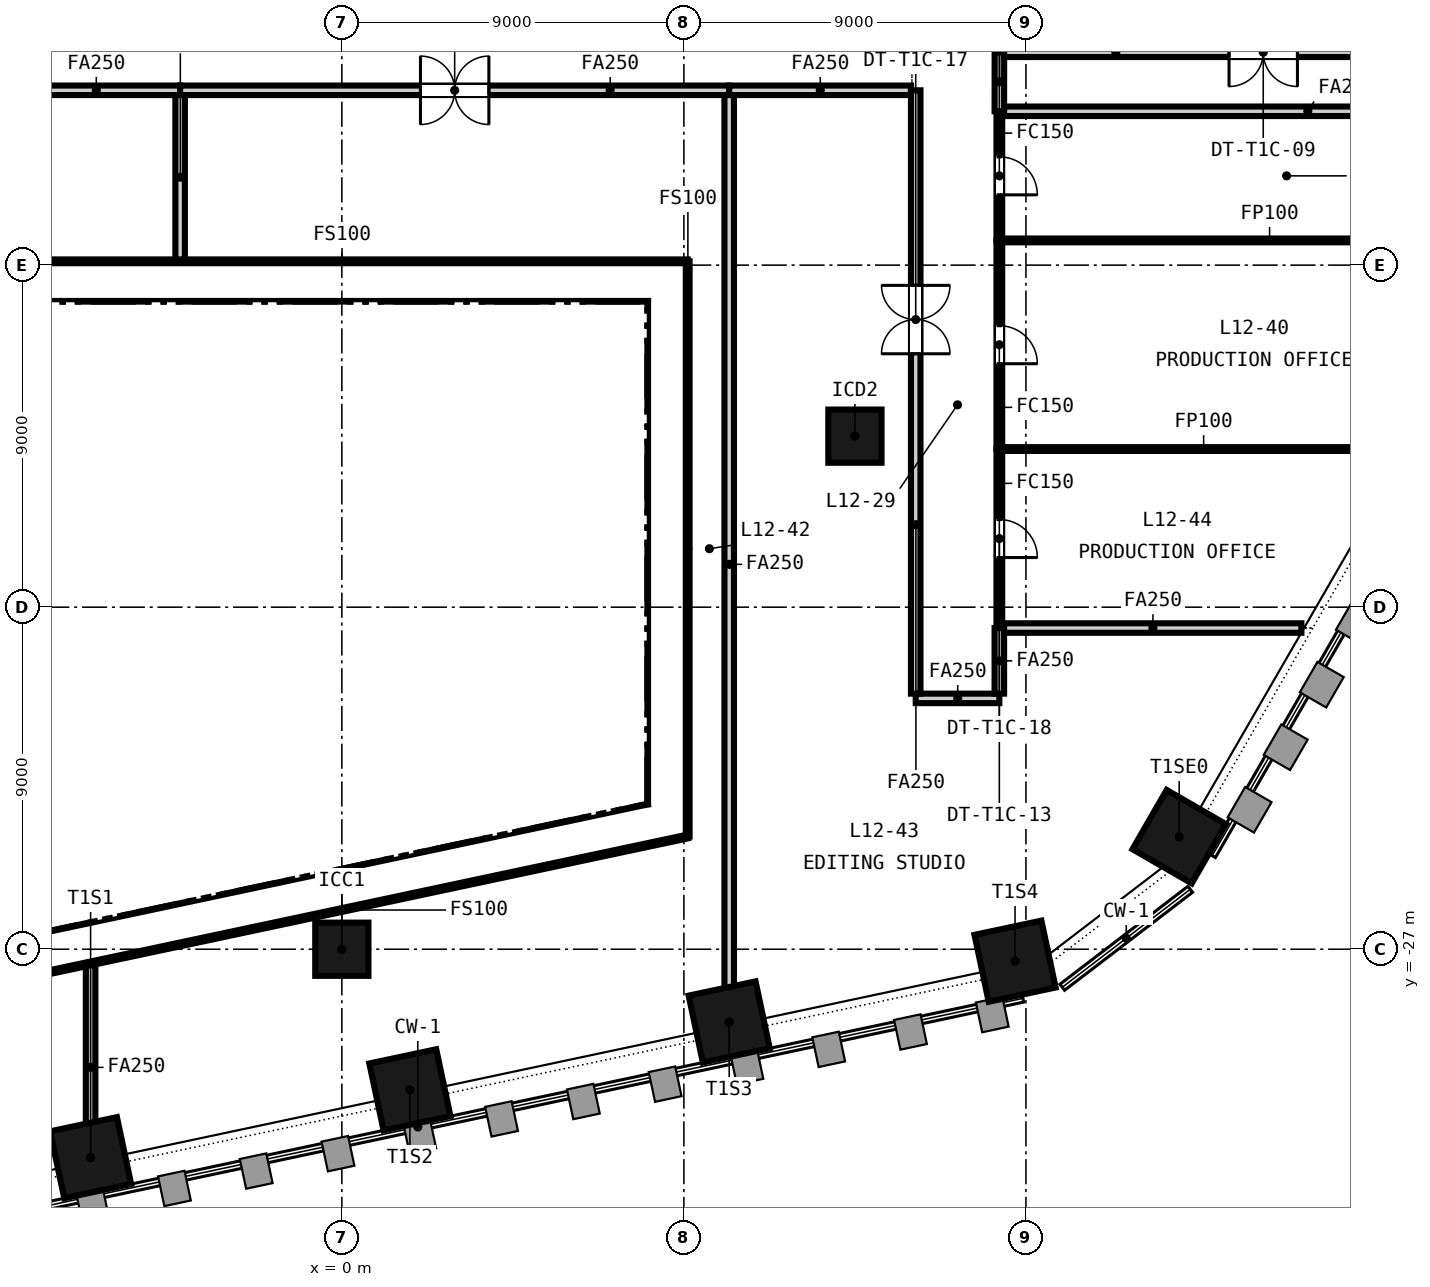
"""IFC4 building model, lengths in metres.
Left out: names, types, materials, properties, quantities, classifications, styles, units other than length and angle.
Written with IfcOpenShell. Run it as: python <this file> out.ifc"""

import sys

from ifc_helpers import new_model, si_unit, direction, frame, frame_2d, origin, origin_2d, place, context, subcontext, project, spatial, rectangle, extrude, element, fill, save


model = new_model("IFC4")
c1 = context("Model", 3, precision=1e-05, world=origin(), true_north=direction((0.0, 1.0)))
c2 = subcontext(c1, "Body", "Model", "MODEL_VIEW")
j1 = project(units=[si_unit("LENGTHUNIT", "METRE"), si_unit("PLANEANGLEUNIT", "RADIAN")], contexts=[c1])
p1 = place(None, origin())
s1 = spatial("IfcSite", under=j1, at=p1, CompositionType="ELEMENT")
p2 = place(p1, origin())
s2 = spatial("IfcBuilding", under=s1, at=p2, CompositionType="ELEMENT")
p3 = place(p2, frame((0.0, 0.0, 57.9)))
s3 = spatial("IfcBuildingStorey", under=s2, at=p3, CompositionType="ELEMENT", Elevation=57.9)
for number, where, z_axis, x_axis in (
    (1, (-6.611, -32.485, -0.15), (0.0, 0.0, 1.0), (0.978, 0.208, 0.0)),
    (2, (1.791, -30.699, -0.15), (0.0, 0.0, 1.0), (0.978, 0.208, 0.0)),
    (3, (10.192, -28.914, -0.15), (0.0, 0.0, 1.0), (0.978, 0.208, 0.0)),
    (4, (17.714, -27.315, -0.15), (0.0, 0.0, 1.0), (0.978, 0.208, 0.0)),
    (5, (22.032, -24.039, -0.15), (0.0, 0.0, 1.0), (0.5, 0.866, 0.0)),
):
    element("IfcColumn", number, at=place(p3, frame(where, z_axis=z_axis, x_axis=x_axis)), inside=s3, PredefinedType="COLUMN", context=c2, shape_type="SweptSolid", body=[
        extrude(rectangle(XDim=1.8, YDim=1.8, at=origin_2d()), origin(), (0.0, 0.0, 1.0), 3.65),
    ])
for number, where, z_axis, x_axis in (
    (6, (0.0, -27.0, -0.15), (0.0, 0.0, 1.0), (1.0, 0.0, 0.0)),
    (7, (13.5, -13.5, -0.15), (0.0, 0.0, 1.0), (1.0, 0.0, 0.0)),
):
    element("IfcColumn", number, at=place(p3, frame(where, z_axis=z_axis, x_axis=x_axis)), inside=s3, PredefinedType="COLUMN", context=c2, shape_type="SweptSolid", body=[
        extrude(rectangle(XDim=1.4, YDim=1.4, at=origin_2d()), origin(), (0.0, 0.0, 1.0), 3.65),
    ])
p4 = place(p3, frame((-4.255, -4.4, 0.0), z_axis=(0.0, 0.0, 1.0), x_axis=(-1.0, 0.0, 0.0)))
e8 = element("IfcWall", 8, at=p4, inside=s3, PredefinedType="PARTITIONING", context=c2, shape_type="SweptSolid", body=[
    extrude(rectangle(XDim=10.72, YDim=0.25, at=frame_2d((5.36, 0.0))), origin(), (0.0, 0.0, 1.0), 2.741),
])
p5 = place(p4, frame((4.472, 0.0, 0.0)))
e9 = element("IfcOpeningElement", 9, at=p5, cuts=e8, PredefinedType="OPENING", context=c2, shape_type="SweptSolid", body=[
    extrude(rectangle(XDim=1.8, YDim=2.1, at=frame_2d((0.9, 1.05))), frame((0.0, 0.135, 0.0), z_axis=(0.0, -1.0, 0.0), x_axis=(1.0, 0.0, 0.0)), (0.0, 0.0, 1.0), 0.27),
])
p6 = place(p3, frame((10.192, -4.4, 0.0), z_axis=(0.0, 0.0, 1.0), x_axis=(-1.0, 0.0, 0.0)))
e10 = element("IfcWall", 10, at=p6, inside=s3, PredefinedType="PARTITIONING", context=c2, shape_type="SweptSolid", body=[
    extrude(rectangle(XDim=14.447, YDim=0.25, at=frame_2d((7.223, 0.0))), origin(), (0.0, 0.0, 1.0), 2.741),
])
p7 = place(p6, frame((6.323, 0.0, 0.0)))
e11 = element("IfcOpeningElement", 11, at=p7, cuts=e10, PredefinedType="OPENING", context=c2, shape_type="SweptSolid", body=[
    extrude(rectangle(XDim=1.8, YDim=2.1, at=frame_2d((0.9, 1.05))), frame((0.0, 0.135, 0.0), z_axis=(0.0, -1.0, 0.0), x_axis=(1.0, 0.0, 0.0)), (0.0, 0.0, 1.0), 0.27),
])
p8 = place(p3, frame((14.975, -4.4, 0.0), z_axis=(0.0, 0.0, 1.0), x_axis=(-1.0, 0.0, 0.0)))
e12 = element("IfcWall", 12, at=p8, inside=s3, PredefinedType="PARTITIONING", context=c2, shape_type="SweptSolid", body=[
    extrude(rectangle(XDim=4.783, YDim=0.25, at=frame_2d((2.392, 0.0))), origin(), (0.0, 0.0, 1.0), 2.741),
])
p9 = place(p3, frame((17.302, -3.4, 0.0), z_axis=(0.0, 0.0, 1.0), x_axis=(-0.00125845425, -0.999999208146, 0.0)))
e13 = element("IfcWall", 13, at=p9, inside=s3, PredefinedType="PARTITIONING", context=c2, shape_type="SweptSolid", body=[
    extrude(rectangle(XDim=1.552, YDim=0.25, at=frame_2d((0.776, 0.0))), origin(), (0.0, 0.0, 1.0), 2.741),
])
p10 = place(p3, frame((31.061, -3.4, 0.0), z_axis=(0.0, 0.0, 1.0), x_axis=(-1.0, 0.0, 0.0)))
e14 = element("IfcWall", 14, at=p10, inside=s3, PredefinedType="PARTITIONING", context=c2, shape_type="SweptSolid", body=[
    extrude(rectangle(XDim=13.634, YDim=0.25, at=frame_2d((6.817, 0.0))), origin(), (0.0, 0.0, 1.0), 2.741),
])
p11 = place(p10, frame((5.917, 0.0, 0.0)))
e15 = element("IfcOpeningElement", 15, at=p11, cuts=e14, PredefinedType="OPENING", context=c2, shape_type="SweptSolid", body=[
    extrude(rectangle(XDim=1.8, YDim=2.1, at=frame_2d((0.9, 1.05))), frame((0.0, 0.135, 0.0), z_axis=(0.0, -1.0, 0.0), x_axis=(1.0, 0.0, 0.0)), (0.0, 0.0, 1.0), 0.27),
])
p12 = place(p3, frame((17.3, -4.952, 0.0), z_axis=(0.0, 0.0, 1.0), x_axis=(0.0, -1.0, 0.0)))
e16 = element("IfcWall", 16, at=p12, inside=s3, PredefinedType="PARTITIONING", context=c2, shape_type="SweptSolid", body=[
    extrude(rectangle(XDim=3.398, YDim=0.15, at=frame_2d((1.699, 0.0))), origin(), (0.0, 0.0, 1.0), 2.741),
])
p13 = place(p12, frame((1.199, 0.0, 0.0)))
e17 = element("IfcOpeningElement", 17, at=p13, cuts=e16, PredefinedType="OPENING", context=c2, shape_type="SweptSolid", body=[
    extrude(rectangle(XDim=1.0, YDim=2.1, at=frame_2d((0.5, 1.05))), frame((0.0, 0.085, 0.0), z_axis=(0.0, -1.0, 0.0), x_axis=(1.0, 0.0, 0.0)), (0.0, 0.0, 1.0), 0.17),
])
p14 = place(p3, frame((17.3, -8.35, 0.0), z_axis=(0.0, 0.0, 1.0), x_axis=(0.0, -1.0, 0.0)))
e18 = element("IfcWall", 18, at=p14, inside=s3, PredefinedType="PARTITIONING", context=c2, shape_type="SweptSolid", body=[
    extrude(rectangle(XDim=5.489, YDim=0.15, at=frame_2d((2.745, 0.0))), origin(), (0.0, 0.0, 1.0), 2.741),
])
p15 = place(p14, frame((2.244, 0.0, 0.0)))
e19 = element("IfcOpeningElement", 19, at=p15, cuts=e18, PredefinedType="OPENING", context=c2, shape_type="SweptSolid", body=[
    extrude(rectangle(XDim=1.0, YDim=2.1, at=frame_2d((0.5, 1.05))), frame((0.0, 0.085, 0.0), z_axis=(0.0, -1.0, 0.0), x_axis=(1.0, 0.0, 0.0)), (0.0, 0.0, 1.0), 0.17),
])
p16 = place(p3, frame((17.3, -20.4, 0.0), z_axis=(0.0, 0.0, 1.0), x_axis=(-1.0, 0.0, 0.0)))
e20 = element("IfcWall", 20, at=p16, inside=s3, PredefinedType="PARTITIONING", context=c2, shape_type="SweptSolid", body=[
    extrude(rectangle(XDim=2.2, YDim=0.25, at=frame_2d((1.1, 0.0))), origin(), (0.0, 0.0, 1.0), 2.741),
])
p17 = place(p3, frame((17.3, -18.549, 0.0), z_axis=(0.0, 0.0, 1.0), x_axis=(0.0, -1.0, 0.0)))
e21 = element("IfcWall", 21, at=p17, inside=s3, PredefinedType="PARTITIONING", context=c2, shape_type="SweptSolid", body=[
    extrude(rectangle(XDim=1.726, YDim=0.25, at=frame_2d((0.863, 0.0))), origin(), (0.0, 0.0, 1.0), 2.741),
])
p18 = place(p3, frame((17.3, -13.839, 0.0), z_axis=(0.0, 0.0, 1.0), x_axis=(0.0, -1.0, 0.0)))
e22 = element("IfcWall", 22, at=p18, inside=s3, PredefinedType="PARTITIONING", context=c2, shape_type="SweptSolid", body=[
    extrude(rectangle(XDim=4.71, YDim=0.15, at=frame_2d((2.355, 0.0))), origin(), (0.0, 0.0, 1.0), 2.741),
])
p19 = place(p18, frame((1.855, 0.0, 0.0)))
e23 = element("IfcOpeningElement", 23, at=p19, cuts=e22, PredefinedType="OPENING", context=c2, shape_type="SweptSolid", body=[
    extrude(rectangle(XDim=1.0, YDim=2.1, at=frame_2d((0.5, 1.05))), frame((0.0, 0.085, 0.0), z_axis=(0.0, -1.0, 0.0), x_axis=(1.0, 0.0, 0.0)), (0.0, 0.0, 1.0), 0.17),
])
p20 = place(p3, frame((33.398, -4.952, 0.0), z_axis=(0.0, 0.0, 1.0), x_axis=(-1.0, 0.0, 0.0)))
e24 = element("IfcWall", 24, at=p20, inside=s3, PredefinedType="PARTITIONING", context=c2, shape_type="SweptSolid", body=[
    extrude(rectangle(XDim=15.973, YDim=0.25, at=frame_2d((7.986, 0.0))), origin(), (0.0, 0.0, 1.0), 2.741),
])
p21 = place(p3, frame((17.375, -8.35, 0.0), z_axis=(0.0, 0.0, 1.0), x_axis=(1.0, 0.0, 0.0)))
e25 = element("IfcWall", 25, at=p21, inside=s3, PredefinedType="PARTITIONING", context=c2, shape_type="SweptSolid", body=[
    extrude(rectangle(XDim=14.062, YDim=0.1, at=frame_2d((7.031, 0.0))), origin(), (0.0, 0.0, 1.0), 2.741),
])
p22 = place(p3, frame((17.375, -13.839, 0.0), z_axis=(0.0, 0.0, 1.0), x_axis=(1.0, 0.0, 0.0)))
e26 = element("IfcWall", 26, at=p22, inside=s3, PredefinedType="PARTITIONING", context=c2, shape_type="SweptSolid", body=[
    extrude(rectangle(XDim=10.592, YDim=0.1, at=frame_2d((5.296, 0.0))), origin(), (0.0, 0.0, 1.0), 2.741),
])
p23 = place(p3, frame((-6.611, -32.792, 0.0), z_axis=(0.0, 0.0, 1.0), x_axis=(0.0, 1.0, 0.0)))
e27 = element("IfcWall", 27, at=p23, inside=s3, PredefinedType="PARTITIONING", context=c2, shape_type="SweptSolid", body=[
    extrude(rectangle(XDim=5.367, YDim=0.25, at=frame_2d((2.684, 0.0))), origin(), (0.0, 0.0, 1.0), 2.741),
])
p24 = place(p3, frame((-4.255, -8.85, 0.0), z_axis=(0.0, 0.0, 1.0), x_axis=(0.0, 1.0, 0.0)))
e28 = element("IfcWall", 28, at=p24, inside=s3, PredefinedType="PARTITIONING", context=c2, shape_type="SweptSolid", body=[
    extrude(rectangle(XDim=4.325, YDim=0.25, at=frame_2d((2.163, 0.0))), origin(), (0.0, 0.0, 1.0), 2.741),
])
p25 = place(p3, frame((10.192, -29.22, 0.0), z_axis=(0.0, 0.0, 1.0), x_axis=(0.0, 1.0, 0.0)))
e29 = element("IfcWall", 29, at=p25, inside=s3, PredefinedType="PARTITIONING", context=c2, shape_type="SweptSolid", body=[
    extrude(rectangle(XDim=24.695, YDim=0.25, at=frame_2d((12.348, 0.0))), origin(), (0.0, 0.0, 1.0), 2.741),
])
p26 = place(p3, frame((15.1, -20.275, 0.0), z_axis=(0.0, 0.0, 1.0), x_axis=(0.0, 1.0, 0.0)))
e30 = element("IfcWall", 30, at=p26, inside=s3, PredefinedType="PARTITIONING", context=c2, shape_type="SweptSolid", body=[
    extrude(rectangle(XDim=15.875, YDim=0.25, at=frame_2d((7.938, 0.0))), origin(), (0.0, 0.0, 1.0), 2.741),
])
p27 = place(p26, frame((8.942, 0.0, 0.0)))
e31 = element("IfcOpeningElement", 31, at=p27, cuts=e30, PredefinedType="OPENING", context=c2, shape_type="SweptSolid", body=[
    extrude(rectangle(XDim=1.8, YDim=2.1, at=frame_2d((0.9, 1.05))), frame((0.0, 0.135, 0.0), z_axis=(0.0, -1.0, 0.0), x_axis=(1.0, 0.0, 0.0)), (0.0, 0.0, 1.0), 0.27),
])
p28 = place(p3, frame((17.425, -18.549, 0.0), z_axis=(0.0, 0.0, 1.0), x_axis=(1.0, 0.0, 0.0)))
e32 = element("IfcWall", 32, at=p28, inside=s3, PredefinedType="PARTITIONING", context=c2, shape_type="SweptSolid", body=[
    extrude(rectangle(XDim=7.823, YDim=0.25, at=frame_2d((3.912, 0.0))), origin(), (0.0, 0.0, 1.0), 2.741),
])
p29 = place(p3, frame((-9.1, -8.9, 0.0), z_axis=(0.0, 0.0, 1.0), x_axis=(1.0, 0.0, 0.0)))
e33 = element("IfcWall", 33, at=p29, inside=s3, PredefinedType="PARTITIONING", context=c2, shape_type="SweptSolid", body=[
    extrude(rectangle(XDim=18.2, YDim=0.1, at=frame_2d((9.1, 0.0))), origin(), (0.0, 0.0, 1.0), 2.741),
])
p30 = place(p3, frame((9.1, -8.9, 0.0), z_axis=(0.0, 0.0, 1.0), x_axis=(0.0, -1.0, 0.0)))
e34 = element("IfcWall", 34, at=p30, inside=s3, PredefinedType="PARTITIONING", context=c2, shape_type="SweptSolid", body=[
    extrude(rectangle(XDim=15.134, YDim=0.1, at=frame_2d((7.567, 0.0))), origin(), (0.0, 0.0, 1.0), 2.741),
])
p31 = place(p3, frame((9.1, -24.034, 0.0), z_axis=(0.0, 0.0, 1.0), x_axis=(-0.978146710971, -0.207915876778, 0.0)))
e35 = element("IfcWall", 35, at=p31, inside=s3, PredefinedType="PARTITIONING", context=c2, shape_type="SweptSolid", body=[
    extrude(rectangle(XDim=18.607, YDim=0.1, at=frame_2d((9.303, 0.0))), origin(), (0.0, 0.0, 1.0), 2.741),
])
p32 = place(p11, origin())
e36 = element("IfcDoor", 36, at=p32, inside=s3, OperationType="DOUBLE_DOOR_DOUBLE_SWING", PredefinedType="DOOR", context=c2, shape_type="SweptSolid", body=[
    extrude(rectangle(XDim=1.8, YDim=2.1, at=frame_2d((0.9, 1.05))), frame((0.0, 0.025, 0.0), z_axis=(0.0, -1.0, 0.0), x_axis=(1.0, 0.0, 0.0)), (0.0, 0.0, 1.0), 0.05),
])
fill(e15, e36)
p33 = place(p13, origin())
e37 = element("IfcDoor", 37, at=p33, inside=s3, OperationType="SINGLE_SWING_RIGHT", PredefinedType="DOOR", context=c2, shape_type="SweptSolid", body=[
    extrude(rectangle(XDim=1.0, YDim=2.1, at=frame_2d((0.5, 1.05))), frame((0.0, 0.025, 0.0), z_axis=(0.0, -1.0, 0.0), x_axis=(1.0, 0.0, 0.0)), (0.0, 0.0, 1.0), 0.05),
])
fill(e17, e37)
p34 = place(p15, origin())
e38 = element("IfcDoor", 38, at=p34, inside=s3, OperationType="SINGLE_SWING_RIGHT", PredefinedType="DOOR", context=c2, shape_type="SweptSolid", body=[
    extrude(rectangle(XDim=1.0, YDim=2.1, at=frame_2d((0.5, 1.05))), frame((0.0, 0.025, 0.0), z_axis=(0.0, -1.0, 0.0), x_axis=(1.0, 0.0, 0.0)), (0.0, 0.0, 1.0), 0.05),
])
fill(e19, e38)
p35 = place(p7, origin())
e39 = element("IfcDoor", 39, at=p35, inside=s3, OperationType="DOUBLE_DOOR_DOUBLE_SWING", PredefinedType="DOOR", context=c2, shape_type="SweptSolid", body=[
    extrude(rectangle(XDim=1.8, YDim=2.1, at=frame_2d((0.9, 1.05))), frame((0.0, 0.025, 0.0), z_axis=(0.0, -1.0, 0.0), x_axis=(1.0, 0.0, 0.0)), (0.0, 0.0, 1.0), 0.05),
])
fill(e11, e39)
p36 = place(p27, origin())
e40 = element("IfcDoor", 40, at=p36, inside=s3, OperationType="DOUBLE_DOOR_DOUBLE_SWING", PredefinedType="DOOR", context=c2, shape_type="SweptSolid", body=[
    extrude(rectangle(XDim=1.8, YDim=2.1, at=frame_2d((0.9, 1.05))), frame((0.0, 0.025, 0.0), z_axis=(0.0, -1.0, 0.0), x_axis=(1.0, 0.0, 0.0)), (0.0, 0.0, 1.0), 0.05),
])
fill(e31, e40)
p37 = place(p19, origin())
e41 = element("IfcDoor", 41, at=p37, inside=s3, OperationType="SINGLE_SWING_RIGHT", PredefinedType="DOOR", context=c2, shape_type="SweptSolid", body=[
    extrude(rectangle(XDim=1.0, YDim=2.1, at=frame_2d((0.5, 1.05))), frame((0.0, 0.025, 0.0), z_axis=(0.0, -1.0, 0.0), x_axis=(1.0, 0.0, 0.0)), (0.0, 0.0, 1.0), 0.05),
])
fill(e23, e41)
save(model, sys.argv[1])
